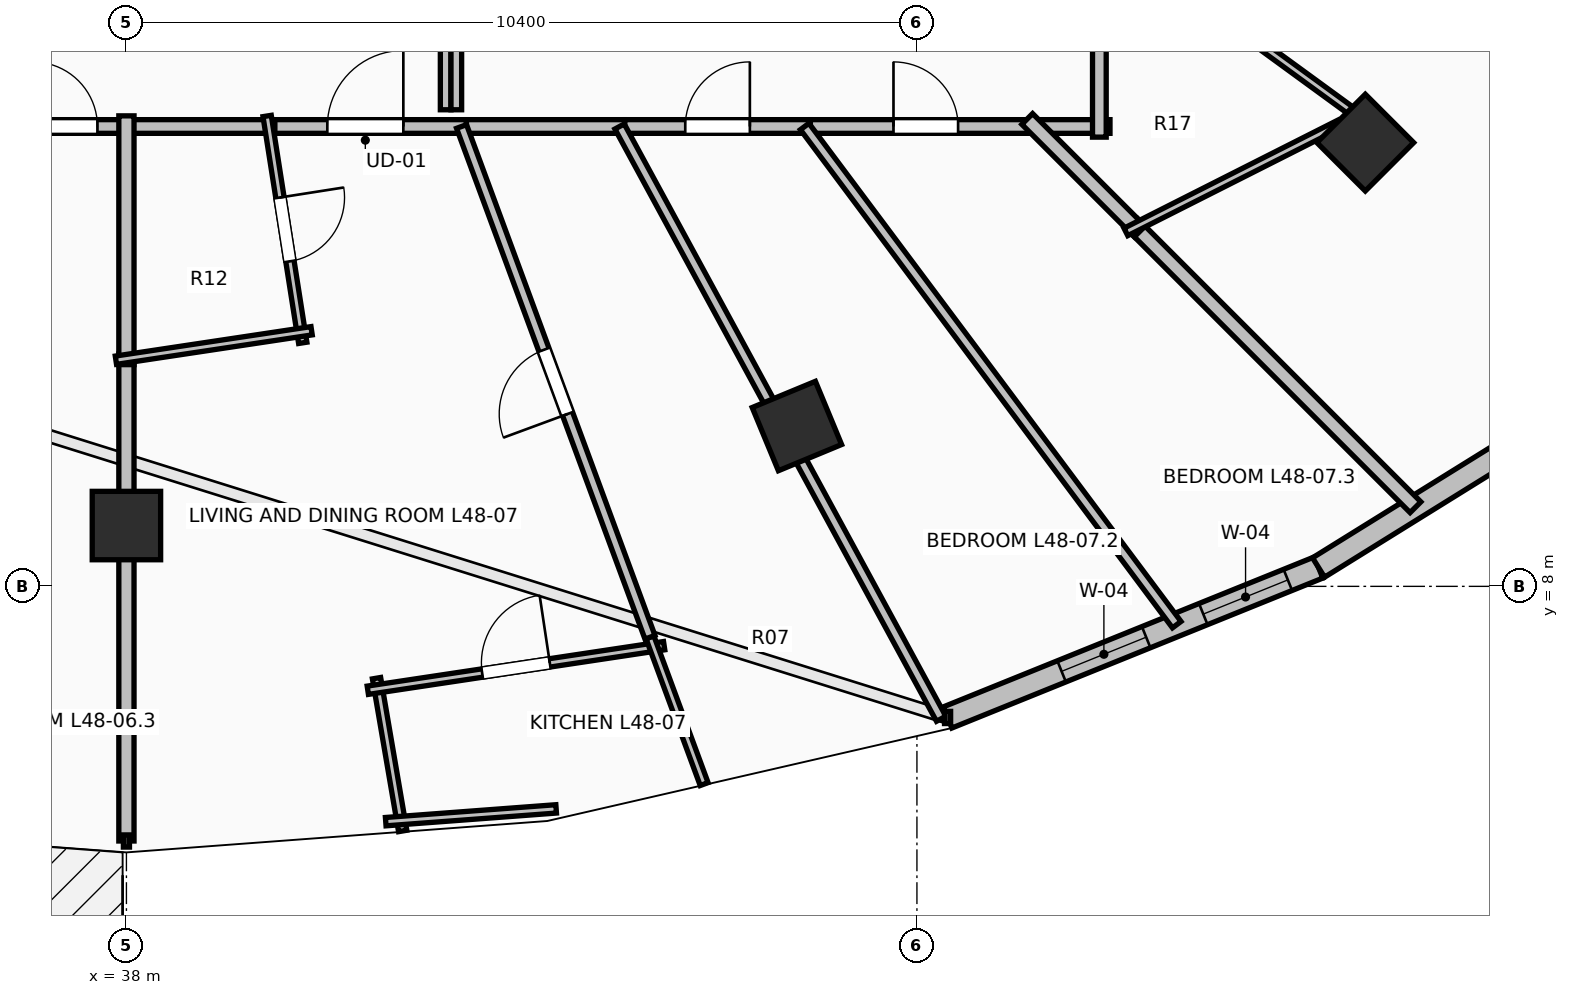
"""IFC4 building model, lengths in metres.
Left out: names, types, materials, properties, quantities, classifications, styles, units other than length and angle.
Written with IfcOpenShell. Run it as: python <this file> out.ifc"""

import sys

from ifc_helpers import new_model, si_unit, direction, frame, frame_2d, origin, origin_2d, place, context, subcontext, project, spatial, rectangle, extrude, element, fill, save


model = new_model("IFC4")
c1 = context("Model", 3, precision=1e-05, world=origin(), true_north=direction((0.0, 1.0)))
c2 = subcontext(c1, "Body", "Model", "MODEL_VIEW")
j1 = project(units=[si_unit("LENGTHUNIT", "METRE"), si_unit("PLANEANGLEUNIT", "RADIAN")], contexts=[c1])
p1 = place(None, origin())
s1 = spatial("IfcSite", under=j1, at=p1, CompositionType="ELEMENT")
p2 = place(p1, origin())
s2 = spatial("IfcBuilding", under=s1, at=p2, CompositionType="ELEMENT")
p3 = place(p2, frame((0.0, 0.0, 179.1)))
s3 = spatial("IfcBuildingStorey", under=s2, at=p3, CompositionType="ELEMENT", Elevation=179.1)
for number, where, z_axis, x_axis in (
    (1, (38.0, 8.8, 0.0), (0.0, 0.0, 1.0), (0.0, -1.0, 0.0)),
    (2, (46.821, 10.109, 0.0), (0.0, 0.0, 1.0), (0.383, -0.924, 0.0)),
    (3, (54.299, 13.838, 0.0), (0.0, 0.0, 1.0), (0.707, -0.707, 0.0)),
):
    element("IfcColumn", number, at=place(p3, frame(where, z_axis=z_axis, x_axis=x_axis)), inside=s3, PredefinedType="COLUMN", context=c2, shape_type="SweptSolid", body=[
        extrude(rectangle(XDim=0.9, YDim=0.9, at=origin_2d()), origin(), (0.0, 0.0, 1.0), 3.5),
    ])
p4 = place(p3, frame((48.803, 6.275, 0.0), z_axis=(0.0, 0.0, 1.0), x_axis=(0.927111094334, 0.374786630981, 0.0)))
e4 = element("IfcWall", 4, at=p4, inside=s3, PredefinedType="STANDARD", context=c2, shape_type="SweptSolid", body=[
    extrude(rectangle(XDim=5.264, YDim=0.3, at=frame_2d((2.632, 0.0))), origin(), (0.0, 0.0, 1.0), 3.24),
])
p5 = place(p4, frame((1.618, 0.0, 0.85)))
e5 = element("IfcOpeningElement", 5, at=p5, cuts=e4, PredefinedType="OPENING", context=c2, shape_type="SweptSolid", body=[
    extrude(rectangle(XDim=1.2, YDim=1.95, at=frame_2d((0.6, 0.975))), frame((0.0, 0.165, 0.0), z_axis=(0.0, -1.0, 0.0), x_axis=(1.0, 0.0, 0.0)), (0.0, 0.0, 1.0), 0.33),
])
p6 = place(p4, frame((3.628, 0.0, 0.85)))
e6 = element("IfcOpeningElement", 6, at=p6, cuts=e4, PredefinedType="OPENING", context=c2, shape_type="SweptSolid", body=[
    extrude(rectangle(XDim=1.2, YDim=1.95, at=frame_2d((0.6, 0.975))), frame((0.0, 0.165, 0.0), z_axis=(0.0, -1.0, 0.0), x_axis=(1.0, 0.0, 0.0)), (0.0, 0.0, 1.0), 0.33),
])
p7 = place(p3, frame((53.684, 8.248, 0.0), z_axis=(0.0, 0.0, 1.0), x_axis=(0.849647657754, 0.527350791858, 0.0)))
e7 = element("IfcWall", 7, at=p7, inside=s3, PredefinedType="STANDARD", context=c2, shape_type="SweptSolid", body=[
    extrude(rectangle(XDim=5.035, YDim=0.3, at=frame_2d((2.518, 0.0))), origin(), (0.0, 0.0, 1.0), 3.24),
])
p8 = place(p3, frame((36.327, 14.05, 0.0), z_axis=(0.0, 0.0, 1.0), x_axis=(1.0, 0.0, 0.0)))
e8 = element("IfcWall", 8, at=p8, inside=s3, PredefinedType="PARTITIONING", context=c2, shape_type="SweptSolid", body=[
    extrude(rectangle(XDim=1.733, YDim=0.18, at=frame_2d((0.867, 0.0))), origin(), (0.0, 0.0, 1.0), 2.922),
])
p9 = place(p8, frame((0.441, 0.0, 0.0)))
e9 = element("IfcOpeningElement", 9, at=p9, cuts=e8, PredefinedType="OPENING", context=c2, shape_type="SweptSolid", body=[
    extrude(rectangle(XDim=0.85, YDim=2.1, at=frame_2d((0.425, 1.05))), frame((0.0, 0.105, 0.0), z_axis=(0.0, -1.0, 0.0), x_axis=(1.0, 0.0, 0.0)), (0.0, 0.0, 1.0), 0.21),
])
p10 = place(p3, frame((39.813, 14.05, 0.0), z_axis=(0.0, 0.0, 1.0), x_axis=(1.0, 0.0, 0.0)))
e10 = element("IfcWall", 10, at=p10, inside=s3, PredefinedType="PARTITIONING", context=c2, shape_type="SweptSolid", body=[
    extrude(rectangle(XDim=2.66, YDim=0.18, at=frame_2d((1.33, 0.0))), origin(), (0.0, 0.0, 1.0), 2.922),
])
p11 = place(p10, frame((0.83, 0.0, 0.0)))
e11 = element("IfcOpeningElement", 11, at=p11, cuts=e10, PredefinedType="OPENING", context=c2, shape_type="SweptSolid", body=[
    extrude(rectangle(XDim=1.0, YDim=2.15, at=frame_2d((0.5, 1.075))), frame((0.0, 0.105, 0.0), z_axis=(0.0, -1.0, 0.0), x_axis=(1.0, 0.0, 0.0)), (0.0, 0.0, 1.0), 0.21),
])
p12 = place(p3, frame((37.92, 14.05, 0.0), z_axis=(0.0, 0.0, 1.0), x_axis=(1.0, 0.0, 0.0)))
e12 = element("IfcWall", 12, at=p12, inside=s3, PredefinedType="PARTITIONING", context=c2, shape_type="SweptSolid", body=[
    extrude(rectangle(XDim=2.033, YDim=0.18, at=frame_2d((1.017, 0.0))), origin(), (0.0, 0.0, 1.0), 2.922),
])
p13 = place(p3, frame((42.473, 14.05, 0.0), z_axis=(0.0, 0.0, 1.0), x_axis=(1.0, 0.0, 0.0)))
e13 = element("IfcWall", 13, at=p13, inside=s3, PredefinedType="PARTITIONING", context=c2, shape_type="SweptSolid", body=[
    extrude(rectangle(XDim=2.083, YDim=0.18, at=frame_2d((1.042, 0.0))), origin(), (0.0, 0.0, 1.0), 2.922),
])
p14 = place(p3, frame((44.556, 14.05, 0.0), z_axis=(0.0, 0.0, 1.0), x_axis=(1.0, 0.0, 0.0)))
e14 = element("IfcWall", 14, at=p14, inside=s3, PredefinedType="PARTITIONING", context=c2, shape_type="SweptSolid", body=[
    extrude(rectangle(XDim=2.442, YDim=0.18, at=frame_2d((1.221, 0.0))), origin(), (0.0, 0.0, 1.0), 2.432),
])
p15 = place(p14, frame((0.796, 0.0, 0.0)))
e15 = element("IfcOpeningElement", 15, at=p15, cuts=e14, PredefinedType="OPENING", context=c2, shape_type="SweptSolid", body=[
    extrude(rectangle(XDim=0.85, YDim=2.1, at=frame_2d((0.425, 1.05))), frame((0.0, 0.105, 0.0), z_axis=(0.0, -1.0, 0.0), x_axis=(1.0, 0.0, 0.0)), (0.0, 0.0, 1.0), 0.21),
])
p16 = place(p3, frame((46.998, 14.05, 0.0), z_axis=(0.0, 0.0, 1.0), x_axis=(1.0, 0.0, 0.0)))
e16 = element("IfcWall", 16, at=p16, inside=s3, PredefinedType="PARTITIONING", context=c2, shape_type="SweptSolid", body=[
    extrude(rectangle(XDim=3.037, YDim=0.18, at=frame_2d((1.519, 0.0))), origin(), (0.0, 0.0, 1.0), 2.432),
])
p17 = place(p16, frame((1.094, 0.0, 0.0)))
e17 = element("IfcOpeningElement", 17, at=p17, cuts=e16, PredefinedType="OPENING", context=c2, shape_type="SweptSolid", body=[
    extrude(rectangle(XDim=0.85, YDim=2.1, at=frame_2d((0.425, 1.05))), frame((0.0, 0.105, 0.0), z_axis=(0.0, -1.0, 0.0), x_axis=(1.0, 0.0, 0.0)), (0.0, 0.0, 1.0), 0.21),
])
p18 = place(p3, frame((49.895, 14.05, 0.0), z_axis=(0.0, 0.0, 1.0), x_axis=(1.0, 0.0, 0.0)))
e18 = element("IfcWall", 18, at=p18, inside=s3, PredefinedType="PARTITIONING", context=c2, shape_type="SweptSolid", body=[
    extrude(rectangle(XDim=1.045, YDim=0.18, at=frame_2d((0.522, 0.0))), origin(), (0.0, 0.0, 1.0), 2.874),
])
p19 = place(p3, frame((50.8, 13.91, 0.0), z_axis=(0.0, 0.0, 1.0), x_axis=(0.0, 1.0, 0.0)))
e19 = element("IfcWall", 19, at=p19, inside=s3, PredefinedType="PARTITIONING", context=c2, shape_type="SweptSolid", body=[
    extrude(rectangle(XDim=2.826, YDim=0.18, at=frame_2d((1.413, 0.0))), origin(), (0.0, 0.0, 1.0), 2.432),
])
p20 = place(p3, frame((38.0, 4.65, 0.0), z_axis=(0.0, 0.0, 1.0), x_axis=(0.0, 1.0, 0.0)))
e20 = element("IfcWall", 20, at=p20, inside=s3, PredefinedType="PARTITIONING", context=c2, shape_type="SweptSolid", body=[
    extrude(rectangle(XDim=6.407, YDim=0.2, at=frame_2d((3.204, 0.0))), origin(), (0.0, 0.0, 1.0), 3.24),
])
p21 = place(p3, frame((38.0, 10.917, 0.0), z_axis=(0.0, 0.0, 1.0), x_axis=(0.0, 1.0, 0.0)))
e21 = element("IfcWall", 21, at=p21, inside=s3, PredefinedType="PARTITIONING", context=c2, shape_type="SweptSolid", body=[
    extrude(rectangle(XDim=3.273, YDim=0.2, at=frame_2d((1.636, 0.0))), origin(), (0.0, 0.0, 1.0), 2.874),
])
p22 = place(p3, frame((39.851, 14.188, 0.0), z_axis=(0.0, 0.0, 1.0), x_axis=(0.154995605388, -0.98791515947, 0.0)))
e22 = element("IfcWall", 22, at=p22, inside=s3, PredefinedType="PARTITIONING", context=c2, shape_type="SweptSolid", body=[
    extrude(rectangle(XDim=3.021, YDim=0.11, at=frame_2d((1.511, 0.0))), origin(), (0.0, 0.0, 1.0), 2.874),
])
p23 = place(p22, frame((1.086, 0.0, 0.0)))
e23 = element("IfcOpeningElement", 23, at=p23, cuts=e22, PredefinedType="OPENING", context=c2, shape_type="SweptSolid", body=[
    extrude(rectangle(XDim=0.85, YDim=2.1, at=frame_2d((0.425, 1.05))), frame((0.0, 0.07, 0.0), z_axis=(0.0, -1.0, 0.0), x_axis=(1.0, 0.0, 0.0)), (0.0, 0.0, 1.0), 0.14),
])
p24 = place(p3, frame((40.436, 11.363, 0.0), z_axis=(0.0, 0.0, 1.0), x_axis=(-0.988852287037, -0.148899813371, 0.0)))
e24 = element("IfcWall", 24, at=p24, inside=s3, PredefinedType="PARTITIONING", context=c2, shape_type="SweptSolid", body=[
    extrude(rectangle(XDim=2.604, YDim=0.11, at=frame_2d((1.302, 0.0))), origin(), (0.0, 0.0, 1.0), 3.24),
])
p25 = place(p3, frame((41.635, 4.782, 0.0), z_axis=(0.0, 0.0, 1.0), x_axis=(-0.168804313657, 0.985649584635, 0.0)))
e25 = element("IfcWall", 25, at=p25, inside=s3, PredefinedType="PARTITIONING", context=c2, shape_type="SweptSolid", body=[
    extrude(rectangle(XDim=2.039, YDim=0.11, at=frame_2d((1.02, 0.0))), origin(), (0.0, 0.0, 1.0), 3.24),
])
p26 = place(p3, frame((41.176, 6.633, 0.0), z_axis=(0.0, 0.0, 1.0), x_axis=(0.988877230123, 0.148734070555, 0.0)))
e26 = element("IfcWall", 26, at=p26, inside=s3, PredefinedType="PARTITIONING", context=c2, shape_type="SweptSolid", body=[
    extrude(rectangle(XDim=3.943, YDim=0.11, at=frame_2d((1.971, 0.0))), origin(), (0.0, 0.0, 1.0), 3.24),
])
p27 = place(p26, frame((1.521, 0.0, 0.0)))
e27 = element("IfcOpeningElement", 27, at=p27, cuts=e26, PredefinedType="OPENING", context=c2, shape_type="SweptSolid", body=[
    extrude(rectangle(XDim=0.9, YDim=2.1, at=frame_2d((0.45, 1.05))), frame((0.0, 0.07, 0.0), z_axis=(0.0, -1.0, 0.0), x_axis=(1.0, 0.0, 0.0)), (0.0, 0.0, 1.0), 0.14),
])
p28 = place(p3, frame((44.887, 7.33, 0.0), z_axis=(0.0, 0.0, 1.0), x_axis=(0.346337161188, -0.938110105894, 0.0)))
e28 = element("IfcWall", 28, at=p28, inside=s3, PredefinedType="PARTITIONING", context=c2, shape_type="SweptSolid", body=[
    extrude(rectangle(XDim=2.059, YDim=0.11, at=frame_2d((1.03, 0.0))), origin(), (0.0, 0.0, 1.0), 3.24),
])
p29 = place(p3, frame((41.411, 4.905, 0.0), z_axis=(0.0, 0.0, 1.0), x_axis=(0.997205784552, 0.074703569226, 0.0)))
e29 = element("IfcWall", 29, at=p29, inside=s3, PredefinedType="PARTITIONING", context=c2, shape_type="SweptSolid", body=[
    extrude(rectangle(XDim=2.249, YDim=0.11, at=frame_2d((1.124, 0.0))), origin(), (0.0, 0.0, 1.0), 3.24),
])
p30 = place(p3, frame((44.888, 7.33, 0.0), z_axis=(0.0, 0.0, 1.0), x_axis=(-0.346082862485, 0.938203950266, 0.0)))
e30 = element("IfcWall", 30, at=p30, inside=s3, PredefinedType="PARTITIONING", context=c2, shape_type="SweptSolid", body=[
    extrude(rectangle(XDim=7.162, YDim=0.14, at=frame_2d((3.581, 0.0))), origin(), (0.0, 0.0, 1.0), 2.432),
])
p31 = place(p30, frame((3.131, 0.0, 0.0)))
e31 = element("IfcOpeningElement", 31, at=p31, cuts=e30, PredefinedType="OPENING", context=c2, shape_type="SweptSolid", body=[
    extrude(rectangle(XDim=0.9, YDim=2.1, at=frame_2d((0.45, 1.05))), frame((0.0, 0.085, 0.0), z_axis=(0.0, -1.0, 0.0), x_axis=(1.0, 0.0, 0.0)), (0.0, 0.0, 1.0), 0.17),
])
p32 = place(p3, frame((48.719, 6.258, 0.0), z_axis=(0.0, 0.0, 1.0), x_axis=(-0.477180576465, 0.878805267078, 0.0)))
e32 = element("IfcWall", 32, at=p32, inside=s3, PredefinedType="PARTITIONING", context=c2, shape_type="SweptSolid", body=[
    extrude(rectangle(XDim=8.866, YDim=0.14, at=frame_2d((4.433, 0.0))), origin(), (0.0, 0.0, 1.0), 2.432),
])
p33 = place(p3, frame((51.818, 7.496, 0.0), z_axis=(0.0, 0.0, 1.0), x_axis=(-0.598399090147, 0.801198183292, 0.0)))
e33 = element("IfcWall", 33, at=p33, inside=s3, PredefinedType="PARTITIONING", context=c2, shape_type="SweptSolid", body=[
    extrude(rectangle(XDim=8.18, YDim=0.14, at=frame_2d((4.09, 0.0))), origin(), (0.0, 0.0, 1.0), 2.432),
])
p34 = place(p3, frame((54.959, 9.041, 0.0), z_axis=(0.0, 0.0, 1.0), x_axis=(-0.707106781187, 0.707106781187, 0.0)))
e34 = element("IfcWall", 34, at=p34, inside=s3, PredefinedType="PARTITIONING", context=c2, shape_type="SweptSolid", body=[
    extrude(rectangle(XDim=5.271, YDim=0.2, at=frame_2d((2.635, 0.0))), origin(), (0.0, 0.0, 1.0), 2.774),
])
p35 = place(p3, frame((51.331, 12.669, 0.0), z_axis=(0.0, 0.0, 1.0), x_axis=(-0.707106781187, 0.707106781187, 0.0)))
e35 = element("IfcWall", 35, at=p35, inside=s3, PredefinedType="PARTITIONING", context=c2, shape_type="SweptSolid", body=[
    extrude(rectangle(XDim=2.093, YDim=0.2, at=frame_2d((1.046, 0.0))), origin(), (0.0, 0.0, 1.0), 2.874),
])
p36 = place(p3, frame((50.687, 16.752, 0.0), z_axis=(0.0, 0.0, 1.0), x_axis=(0.808074646764, -0.589080100883, 0.0)))
e36 = element("IfcWall", 36, at=p36, inside=s3, PredefinedType="PARTITIONING", context=c2, shape_type="SweptSolid", body=[
    extrude(rectangle(XDim=4.329, YDim=0.11, at=frame_2d((2.165, 0.0))), origin(), (0.0, 0.0, 1.0), 2.874),
])
p37 = place(p36, frame((1.74, 0.0, 0.0)))
e37 = element("IfcOpeningElement", 37, at=p37, cuts=e36, PredefinedType="OPENING", context=c2, shape_type="SweptSolid", body=[
    extrude(rectangle(XDim=0.85, YDim=2.1, at=frame_2d((0.425, 1.05))), frame((0.0, 0.07, 0.0), z_axis=(0.0, -1.0, 0.0), x_axis=(1.0, 0.0, 0.0)), (0.0, 0.0, 1.0), 0.14),
])
p38 = place(p3, frame((53.964, 14.085, 0.0), z_axis=(0.0, 0.0, 1.0), x_axis=(-0.892546166909, -0.450956028828, 0.0)))
e38 = element("IfcWall", 38, at=p38, inside=s3, PredefinedType="PARTITIONING", context=c2, shape_type="SweptSolid", body=[
    extrude(rectangle(XDim=3.154, YDim=0.11, at=frame_2d((1.577, 0.0))), origin(), (0.0, 0.0, 1.0), 2.432),
])
for number, where, z_axis, x_axis in (
    (39, (42.2, 16.1, 0.0), (0.0, 0.0, 1.0), (0.0, -1.0, 0.0)),
    (40, (42.34, 14.27, 0.0), (0.0, 0.0, 1.0), (0.0, 1.0, 0.0)),
):
    element("IfcWall", number, at=place(p3, frame(where, z_axis=z_axis, x_axis=x_axis)), inside=s3, PredefinedType="PARTITIONING", context=c2, shape_type="SweptSolid", body=[
        extrude(rectangle(XDim=1.83, YDim=0.14, at=frame_2d((0.915, 0.0))), origin(), (0.0, 0.0, 1.0), 2.922),
    ])
p39 = place(p5, origin())
e41 = element("IfcWindow", 41, at=p39, inside=s3, PartitioningType="SINGLE_PANEL", PredefinedType="WINDOW", context=c2, shape_type="SweptSolid", body=[
    extrude(rectangle(XDim=1.2, YDim=1.95, at=frame_2d((0.6, 0.975))), frame((0.0, 0.03, 0.0), z_axis=(0.0, -1.0, 0.0), x_axis=(1.0, 0.0, 0.0)), (0.0, 0.0, 1.0), 0.06),
])
fill(e5, e41)
p40 = place(p6, origin())
e42 = element("IfcWindow", 42, at=p40, inside=s3, PartitioningType="SINGLE_PANEL", PredefinedType="WINDOW", context=c2, shape_type="SweptSolid", body=[
    extrude(rectangle(XDim=1.2, YDim=1.95, at=frame_2d((0.6, 0.975))), frame((0.0, 0.03, 0.0), z_axis=(0.0, -1.0, 0.0), x_axis=(1.0, 0.0, 0.0)), (0.0, 0.0, 1.0), 0.06),
])
fill(e6, e42)
p41 = place(p11, origin())
e43 = element("IfcDoor", 43, at=p41, inside=s3, OperationType="SINGLE_SWING_RIGHT", PredefinedType="DOOR", context=c2, shape_type="SweptSolid", body=[
    extrude(rectangle(XDim=1.0, YDim=2.15, at=frame_2d((0.5, 1.075))), frame((0.0, 0.025, 0.0), z_axis=(0.0, -1.0, 0.0), x_axis=(1.0, 0.0, 0.0)), (0.0, 0.0, 1.0), 0.05),
])
fill(e11, e43)
p42 = place(p23, origin())
e44 = element("IfcDoor", 44, at=p42, inside=s3, OperationType="SINGLE_SWING_LEFT", PredefinedType="DOOR", context=c2, shape_type="SweptSolid", body=[
    extrude(rectangle(XDim=0.85, YDim=2.1, at=frame_2d((0.425, 1.05))), frame((0.0, 0.025, 0.0), z_axis=(0.0, -1.0, 0.0), x_axis=(1.0, 0.0, 0.0)), (0.0, 0.0, 1.0), 0.05),
])
fill(e23, e44)
p43 = place(p27, origin())
e45 = element("IfcDoor", 45, at=p43, inside=s3, OperationType="SINGLE_SWING_RIGHT", PredefinedType="DOOR", context=c2, shape_type="SweptSolid", body=[
    extrude(rectangle(XDim=0.9, YDim=2.1, at=frame_2d((0.45, 1.05))), frame((0.0, 0.025, 0.0), z_axis=(0.0, -1.0, 0.0), x_axis=(1.0, 0.0, 0.0)), (0.0, 0.0, 1.0), 0.05),
])
fill(e27, e45)
p44 = place(p31, origin())
e46 = element("IfcDoor", 46, at=p44, inside=s3, OperationType="SINGLE_SWING_LEFT", PredefinedType="DOOR", context=c2, shape_type="SweptSolid", body=[
    extrude(rectangle(XDim=0.9, YDim=2.1, at=frame_2d((0.45, 1.05))), frame((0.0, 0.025, 0.0), z_axis=(0.0, -1.0, 0.0), x_axis=(1.0, 0.0, 0.0)), (0.0, 0.0, 1.0), 0.05),
])
fill(e31, e46)
p45 = place(p9, origin())
e47 = element("IfcDoor", 47, at=p45, inside=s3, OperationType="SINGLE_SWING_LEFT", PredefinedType="DOOR", context=c2, shape_type="SweptSolid", body=[
    extrude(rectangle(XDim=0.85, YDim=2.1, at=frame_2d((0.425, 1.05))), frame((0.0, 0.025, 0.0), z_axis=(0.0, -1.0, 0.0), x_axis=(1.0, 0.0, 0.0)), (0.0, 0.0, 1.0), 0.05),
])
fill(e9, e47)
p46 = place(p15, origin())
e48 = element("IfcDoor", 48, at=p46, inside=s3, OperationType="SINGLE_SWING_RIGHT", PredefinedType="DOOR", context=c2, shape_type="SweptSolid", body=[
    extrude(rectangle(XDim=0.85, YDim=2.1, at=frame_2d((0.425, 1.05))), frame((0.0, 0.025, 0.0), z_axis=(0.0, -1.0, 0.0), x_axis=(1.0, 0.0, 0.0)), (0.0, 0.0, 1.0), 0.05),
])
fill(e15, e48)
p47 = place(p17, origin())
e49 = element("IfcDoor", 49, at=p47, inside=s3, OperationType="SINGLE_SWING_LEFT", PredefinedType="DOOR", context=c2, shape_type="SweptSolid", body=[
    extrude(rectangle(XDim=0.85, YDim=2.1, at=frame_2d((0.425, 1.05))), frame((0.0, 0.025, 0.0), z_axis=(0.0, -1.0, 0.0), x_axis=(1.0, 0.0, 0.0)), (0.0, 0.0, 1.0), 0.05),
])
fill(e17, e49)
save(model, sys.argv[1])
